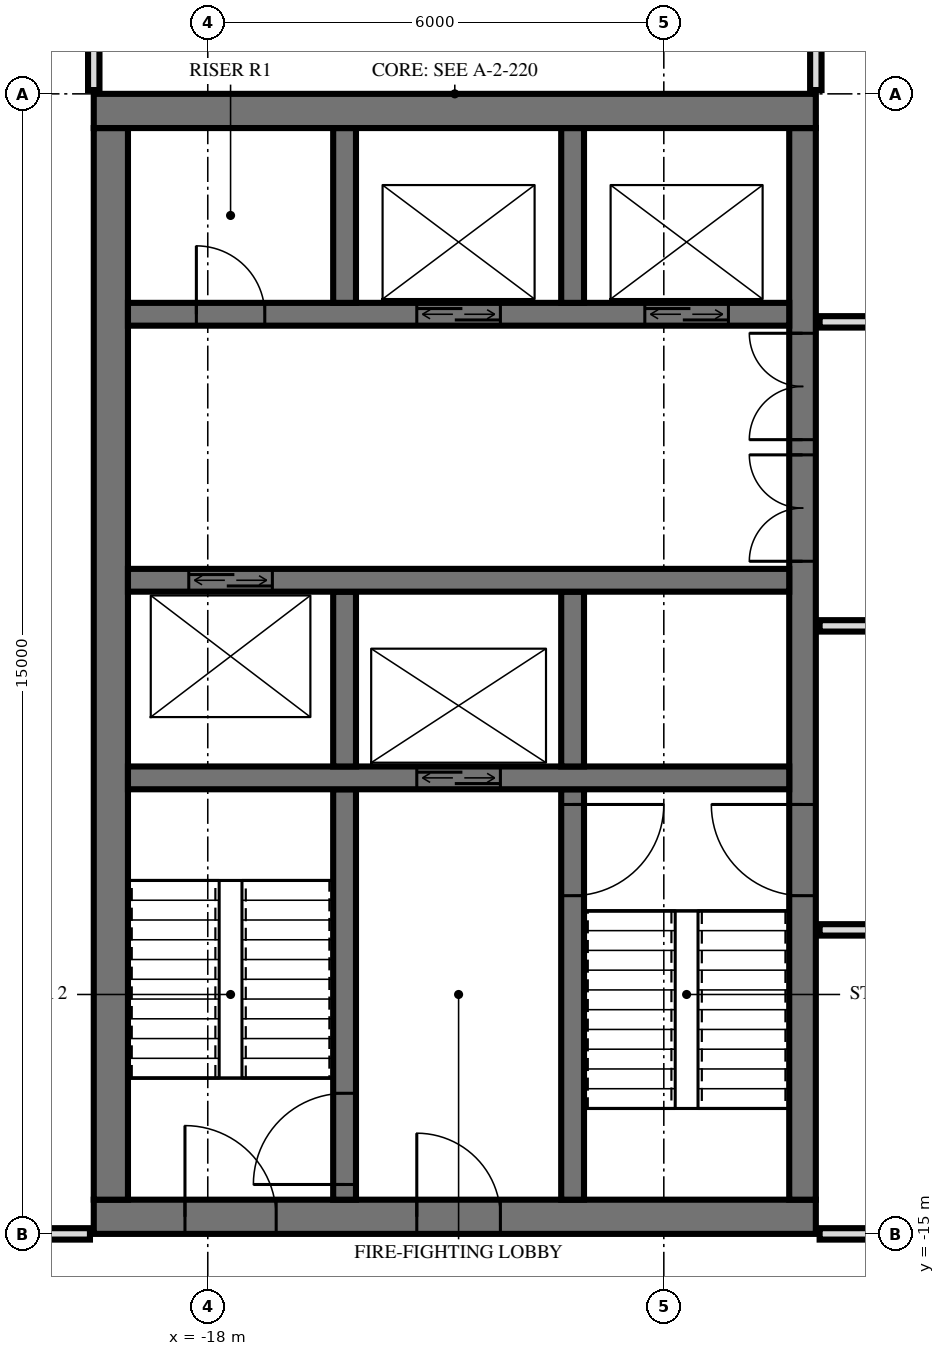
"""IFC4 building model, lengths in metres.
Left out: names, types, materials, properties, quantities, classifications, styles, units other than length and angle.
Written with IfcOpenShell. Run it as: python <this file> out.ifc"""

import sys

from ifc_helpers import new_model, si_unit, direction, frame, frame_2d, origin, place, context, subcontext, project, spatial, rectangle, extrude, element, fill, save


model = new_model("IFC4")
c1 = context("Model", 3, precision=1e-05, world=origin(), true_north=direction((0.0, 1.0)))
c2 = subcontext(c1, "Body", "Model", "MODEL_VIEW")
j1 = project(units=[si_unit("LENGTHUNIT", "METRE"), si_unit("PLANEANGLEUNIT", "RADIAN")], contexts=[c1])
p1 = place(None, origin())
s1 = spatial("IfcSite", under=j1, at=p1, CompositionType="ELEMENT")
p2 = place(p1, origin())
s2 = spatial("IfcBuilding", under=s1, at=p2, CompositionType="ELEMENT")
p3 = place(p2, frame((0.0, 0.0, 322.6)))
s3 = spatial("IfcBuildingStorey", under=s2, at=p3, CompositionType="ELEMENT", Elevation=322.6)
p4 = place(p3, frame((-19.5, -0.225, 0.0), z_axis=(0.0, 0.0, 1.0), x_axis=(1.0, 0.0, 0.0)))
e1 = element("IfcWall", 1, at=p4, inside=s3, PredefinedType="SHEAR", context=c2, shape_type="SweptSolid", body=[
    extrude(rectangle(XDim=9.5, YDim=0.45, at=frame_2d((4.75, 0.0))), origin(), (0.0, 0.0, 1.0), 4.0),
])
p5 = place(p3, frame((-19.5, -14.775, 0.0), z_axis=(0.0, 0.0, 1.0), x_axis=(1.0, 0.0, 0.0)))
e2 = element("IfcWall", 2, at=p5, inside=s3, PredefinedType="SHEAR", context=c2, shape_type="SweptSolid", body=[
    extrude(rectangle(XDim=9.5, YDim=0.45, at=frame_2d((4.75, 0.0))), origin(), (0.0, 0.0, 1.0), 4.0),
])
p6 = place(p5, frame((1.2, 0.0, 0.0)))
e3 = element("IfcOpeningElement", 3, at=p6, cuts=e2, PredefinedType="OPENING", context=c2, shape_type="SweptSolid", body=[
    extrude(rectangle(XDim=1.2, YDim=2.1, at=frame_2d((0.6, 1.05))), frame((0.0, 0.235, 0.0), z_axis=(0.0, -1.0, 0.0), x_axis=(1.0, 0.0, 0.0)), (0.0, 0.0, 1.0), 0.47),
])
p7 = place(p5, frame((4.25, 0.0, 0.0)))
e4 = element("IfcOpeningElement", 4, at=p7, cuts=e2, PredefinedType="OPENING", context=c2, shape_type="SweptSolid", body=[
    extrude(rectangle(XDim=1.1, YDim=2.1, at=frame_2d((0.55, 1.05))), frame((0.0, 0.235, 0.0), z_axis=(0.0, -1.0, 0.0), x_axis=(1.0, 0.0, 0.0)), (0.0, 0.0, 1.0), 0.47),
])
p8 = place(p3, frame((-10.175, -14.55, 0.0), z_axis=(0.0, 0.0, 1.0), x_axis=(0.0, 1.0, 0.0)))
e5 = element("IfcWall", 5, at=p8, inside=s3, PredefinedType="SHEAR", context=c2, shape_type="SweptSolid", body=[
    extrude(rectangle(XDim=14.1, YDim=0.35, at=frame_2d((7.05, 0.0))), origin(), (0.0, 0.0, 1.0), 4.0),
])
p9 = place(p8, frame((8.4, 0.0, 0.0)))
e6 = element("IfcOpeningElement", 6, at=p9, cuts=e5, PredefinedType="OPENING", context=c2, shape_type="SweptSolid", body=[
    extrude(rectangle(XDim=1.4, YDim=2.4, at=frame_2d((0.7, 1.2))), frame((0.0, 0.185, 0.0), z_axis=(0.0, -1.0, 0.0), x_axis=(1.0, 0.0, 0.0)), (0.0, 0.0, 1.0), 0.37),
])
p10 = place(p8, frame((10.0, 0.0, 0.0)))
e7 = element("IfcOpeningElement", 7, at=p10, cuts=e5, PredefinedType="OPENING", context=c2, shape_type="SweptSolid", body=[
    extrude(rectangle(XDim=1.4, YDim=2.4, at=frame_2d((0.7, 1.2))), frame((0.0, 0.185, 0.0), z_axis=(0.0, -1.0, 0.0), x_axis=(1.0, 0.0, 0.0)), (0.0, 0.0, 1.0), 0.37),
])
p11 = place(p8, frame((4.0, 0.0, 0.0)))
e8 = element("IfcOpeningElement", 8, at=p11, cuts=e5, PredefinedType="OPENING", context=c2, shape_type="SweptSolid", body=[
    extrude(rectangle(XDim=1.2, YDim=2.1, at=frame_2d((0.6, 1.05))), frame((0.0, 0.185, 0.0), z_axis=(0.0, -1.0, 0.0), x_axis=(1.0, 0.0, 0.0)), (0.0, 0.0, 1.0), 0.37),
])
p12 = place(p3, frame((-19.275, -14.55, 0.0), z_axis=(0.0, 0.0, 1.0), x_axis=(0.0, 1.0, 0.0)))
e9 = element("IfcWall", 9, at=p12, inside=s3, PredefinedType="SHEAR", context=c2, shape_type="SweptSolid", body=[
    extrude(rectangle(XDim=14.1, YDim=0.45, at=frame_2d((7.05, 0.0))), origin(), (0.0, 0.0, 1.0), 4.0),
])
p13 = place(p3, frame((-19.05, -2.9, 0.0), z_axis=(0.0, 0.0, 1.0), x_axis=(1.0, 0.0, 0.0)))
e10 = element("IfcWall", 10, at=p13, inside=s3, PredefinedType="SHEAR", context=c2, shape_type="SweptSolid", body=[
    extrude(rectangle(XDim=8.7, YDim=0.3, at=frame_2d((4.35, 0.0))), origin(), (0.0, 0.0, 1.0), 4.0),
])
p14 = place(p13, frame((6.8, 0.0, 0.0)))
e11 = element("IfcOpeningElement", 11, at=p14, cuts=e10, PredefinedType="OPENING", context=c2, shape_type="SweptSolid", body=[
    extrude(rectangle(XDim=1.1, YDim=2.1, at=frame_2d((0.55, 1.05))), frame((0.0, 0.16, 0.0), z_axis=(0.0, -1.0, 0.0), x_axis=(1.0, 0.0, 0.0)), (0.0, 0.0, 1.0), 0.32),
])
p15 = place(p13, frame((3.8, 0.0, 0.0)))
e12 = element("IfcOpeningElement", 12, at=p15, cuts=e10, PredefinedType="OPENING", context=c2, shape_type="SweptSolid", body=[
    extrude(rectangle(XDim=1.1, YDim=2.1, at=frame_2d((0.55, 1.05))), frame((0.0, 0.16, 0.0), z_axis=(0.0, -1.0, 0.0), x_axis=(1.0, 0.0, 0.0)), (0.0, 0.0, 1.0), 0.32),
])
p16 = place(p13, frame((0.9, 0.0, 0.0)))
e13 = element("IfcOpeningElement", 13, at=p16, cuts=e10, PredefinedType="OPENING", context=c2, shape_type="SweptSolid", body=[
    extrude(rectangle(XDim=0.9, YDim=2.1, at=frame_2d((0.45, 1.05))), frame((0.0, 0.16, 0.0), z_axis=(0.0, -1.0, 0.0), x_axis=(1.0, 0.0, 0.0)), (0.0, 0.0, 1.0), 0.32),
])
p17 = place(p3, frame((-19.05, -6.4, 0.0), z_axis=(0.0, 0.0, 1.0), x_axis=(1.0, 0.0, 0.0)))
e14 = element("IfcWall", 14, at=p17, inside=s3, PredefinedType="SHEAR", context=c2, shape_type="SweptSolid", body=[
    extrude(rectangle(XDim=8.7, YDim=0.3, at=frame_2d((4.35, 0.0))), origin(), (0.0, 0.0, 1.0), 4.0),
])
p18 = place(p17, frame((0.8, 0.0, 0.0)))
e15 = element("IfcOpeningElement", 15, at=p18, cuts=e14, PredefinedType="OPENING", context=c2, shape_type="SweptSolid", body=[
    extrude(rectangle(XDim=1.1, YDim=2.1, at=frame_2d((0.55, 1.05))), frame((0.0, 0.16, 0.0), z_axis=(0.0, -1.0, 0.0), x_axis=(1.0, 0.0, 0.0)), (0.0, 0.0, 1.0), 0.32),
])
p19 = place(p3, frame((-19.05, -9.0, 0.0), z_axis=(0.0, 0.0, 1.0), x_axis=(1.0, 0.0, 0.0)))
e16 = element("IfcWall", 16, at=p19, inside=s3, PredefinedType="SHEAR", context=c2, shape_type="SweptSolid", body=[
    extrude(rectangle(XDim=8.7, YDim=0.3, at=frame_2d((4.35, 0.0))), origin(), (0.0, 0.0, 1.0), 4.0),
])
p20 = place(p19, frame((3.8, 0.0, 0.0)))
e17 = element("IfcOpeningElement", 17, at=p20, cuts=e16, PredefinedType="OPENING", context=c2, shape_type="SweptSolid", body=[
    extrude(rectangle(XDim=1.1, YDim=2.1, at=frame_2d((0.55, 1.05))), frame((0.0, 0.16, 0.0), z_axis=(0.0, -1.0, 0.0), x_axis=(1.0, 0.0, 0.0)), (0.0, 0.0, 1.0), 0.32),
])
for number, where, z_axis, x_axis in (
    (18, (-13.2, -2.75, 0.0), (0.0, 0.0, 1.0), (0.0, 1.0, 0.0)),
    (19, (-13.2, -8.85, 0.0), (0.0, 0.0, 1.0), (0.0, 1.0, 0.0)),
):
    element("IfcWall", number, at=place(p3, frame(where, z_axis=z_axis, x_axis=x_axis)), inside=s3, PredefinedType="SHEAR", context=c2, shape_type="SweptSolid", body=[
        extrude(rectangle(XDim=2.3, YDim=0.3, at=frame_2d((1.15, 0.0))), origin(), (0.0, 0.0, 1.0), 4.0),
    ])
p21 = place(p3, frame((-13.2, -14.55, 0.0), z_axis=(0.0, 0.0, 1.0), x_axis=(0.0, 1.0, 0.0)))
e20 = element("IfcWall", 20, at=p21, inside=s3, PredefinedType="SHEAR", context=c2, shape_type="SweptSolid", body=[
    extrude(rectangle(XDim=5.4, YDim=0.3, at=frame_2d((2.7, 0.0))), origin(), (0.0, 0.0, 1.0), 4.0),
])
p22 = place(p21, frame((4.0, 0.0, 0.0)))
e21 = element("IfcOpeningElement", 21, at=p22, cuts=e20, PredefinedType="OPENING", context=c2, shape_type="SweptSolid", body=[
    extrude(rectangle(XDim=1.2, YDim=2.1, at=frame_2d((0.6, 1.05))), frame((0.0, 0.16, 0.0), z_axis=(0.0, -1.0, 0.0), x_axis=(1.0, 0.0, 0.0)), (0.0, 0.0, 1.0), 0.32),
])
for number, where, z_axis, x_axis in (
    (22, (-16.2, -2.75, 0.0), (0.0, 0.0, 1.0), (0.0, 1.0, 0.0)),
    (23, (-16.2, -8.85, 0.0), (0.0, 0.0, 1.0), (0.0, 1.0, 0.0)),
):
    element("IfcWall", number, at=place(p3, frame(where, z_axis=z_axis, x_axis=x_axis)), inside=s3, PredefinedType="SHEAR", context=c2, shape_type="SweptSolid", body=[
        extrude(rectangle(XDim=2.3, YDim=0.3, at=frame_2d((1.15, 0.0))), origin(), (0.0, 0.0, 1.0), 4.0),
    ])
p23 = place(p3, frame((-16.2, -14.55, 0.0), z_axis=(0.0, 0.0, 1.0), x_axis=(0.0, 1.0, 0.0)))
e24 = element("IfcWall", 24, at=p23, inside=s3, PredefinedType="SHEAR", context=c2, shape_type="SweptSolid", body=[
    extrude(rectangle(XDim=5.4, YDim=0.3, at=frame_2d((2.7, 0.0))), origin(), (0.0, 0.0, 1.0), 4.0),
])
p24 = place(p23, frame((0.2, 0.0, 0.0)))
e25 = element("IfcOpeningElement", 25, at=p24, cuts=e24, PredefinedType="OPENING", context=c2, shape_type="SweptSolid", body=[
    extrude(rectangle(XDim=1.2, YDim=2.1, at=frame_2d((0.6, 1.05))), frame((0.0, 0.16, 0.0), z_axis=(0.0, -1.0, 0.0), x_axis=(1.0, 0.0, 0.0)), (0.0, 0.0, 1.0), 0.32),
])
p25 = place(p3, frame((-19.568, 1.175, 0.0), z_axis=(0.0, 0.0, 1.0), x_axis=(-0.949694735798, -0.313177120489, 0.0)))
e26 = element("IfcWall", 26, at=p25, inside=s3, PredefinedType="SOLIDWALL", context=c2, shape_type="SweptSolid", body=[
    extrude(rectangle(XDim=1.681, YDim=0.25, at=frame_2d((0.841, 0.0))), origin(), (0.0, 0.0, 1.0), 3.72),
])
p26 = place(p3, frame((-10.0, 0.05, 0.0), z_axis=(0.0, 0.0, 1.0), x_axis=(0.0, 1.0, 0.0)))
e27 = element("IfcWall", 27, at=p26, inside=s3, PredefinedType="PARTITIONING", context=c2, shape_type="SweptSolid", body=[
    extrude(rectangle(XDim=2.247, YDim=0.15, at=frame_2d((1.123, 0.0))), origin(), (0.0, 0.0, 1.0), 3.72),
])
p27 = place(p3, frame((-19.5, 0.05, 0.0), z_axis=(0.0, 0.0, 1.0), x_axis=(0.0, 1.0, 0.0)))
e28 = element("IfcWall", 28, at=p27, inside=s3, PredefinedType="PARTITIONING", context=c2, shape_type="SweptSolid", body=[
    extrude(rectangle(XDim=1.08, YDim=0.15, at=frame_2d((0.54, 0.0))), origin(), (0.0, 0.0, 1.0), 3.72),
])
p28 = place(p3, frame((-21.935, -15.0, 0.0), z_axis=(0.0, 0.0, 1.0), x_axis=(1.0, 0.0, 0.0)))
e29 = element("IfcWall", 29, at=p28, inside=s3, PredefinedType="PARTITIONING", context=c2, shape_type="SweptSolid", body=[
    extrude(rectangle(XDim=2.385, YDim=0.15, at=frame_2d((1.192, 0.0))), origin(), (0.0, 0.0, 1.0), 3.72),
])
p29 = place(p28, frame((0.627, 0.0, 0.0)))
e30 = element("IfcOpeningElement", 30, at=p29, cuts=e29, PredefinedType="OPENING", context=c2, shape_type="SweptSolid", body=[
    extrude(rectangle(XDim=1.0, YDim=2.1, at=frame_2d((0.5, 1.05))), frame((0.0, 0.085, 0.0), z_axis=(0.0, -1.0, 0.0), x_axis=(1.0, 0.0, 0.0)), (0.0, 0.0, 1.0), 0.17),
])
p30 = place(p3, frame((-9.95, -15.0, 0.0), z_axis=(0.0, 0.0, 1.0), x_axis=(1.0, 0.0, 0.0)))
e31 = element("IfcWall", 31, at=p30, inside=s3, PredefinedType="PARTITIONING", context=c2, shape_type="SweptSolid", body=[
    extrude(rectangle(XDim=2.642, YDim=0.15, at=frame_2d((1.321, 0.0))), origin(), (0.0, 0.0, 1.0), 3.084),
])
p31 = place(p3, frame((-9.95, -11.0, 0.0), z_axis=(0.0, 0.0, 1.0), x_axis=(1.0, 0.0, 0.0)))
e32 = element("IfcWall", 32, at=p31, inside=s3, PredefinedType="PARTITIONING", context=c2, shape_type="SweptSolid", body=[
    extrude(rectangle(XDim=19.9, YDim=0.15, at=frame_2d((9.95, 0.0))), origin(), (0.0, 0.0, 1.0), 3.72),
])
p32 = place(p31, frame((9.45, 0.0, 0.0)))
e33 = element("IfcOpeningElement", 33, at=p32, cuts=e32, PredefinedType="OPENING", context=c2, shape_type="SweptSolid", body=[
    extrude(rectangle(XDim=1.0, YDim=2.1, at=frame_2d((0.5, 1.05))), frame((0.0, 0.085, 0.0), z_axis=(0.0, -1.0, 0.0), x_axis=(1.0, 0.0, 0.0)), (0.0, 0.0, 1.0), 0.17),
])
p33 = place(p31, frame((3.45, 0.0, 0.0)))
e34 = element("IfcOpeningElement", 34, at=p33, cuts=e32, PredefinedType="OPENING", context=c2, shape_type="SweptSolid", body=[
    extrude(rectangle(XDim=1.0, YDim=2.1, at=frame_2d((0.5, 1.05))), frame((0.0, 0.085, 0.0), z_axis=(0.0, -1.0, 0.0), x_axis=(1.0, 0.0, 0.0)), (0.0, 0.0, 1.0), 0.17),
])
p34 = place(p3, frame((-9.95, -7.0, 0.0), z_axis=(0.0, 0.0, 1.0), x_axis=(1.0, 0.0, 0.0)))
e35 = element("IfcWall", 35, at=p34, inside=s3, PredefinedType="PARTITIONING", context=c2, shape_type="SweptSolid", body=[
    extrude(rectangle(XDim=19.9, YDim=0.15, at=frame_2d((9.95, 0.0))), origin(), (0.0, 0.0, 1.0), 3.72),
])
p35 = place(p34, frame((9.45, 0.0, 0.0)))
e36 = element("IfcOpeningElement", 36, at=p35, cuts=e35, PredefinedType="OPENING", context=c2, shape_type="SweptSolid", body=[
    extrude(rectangle(XDim=1.0, YDim=2.1, at=frame_2d((0.5, 1.05))), frame((0.0, 0.085, 0.0), z_axis=(0.0, -1.0, 0.0), x_axis=(1.0, 0.0, 0.0)), (0.0, 0.0, 1.0), 0.17),
])
p36 = place(p34, frame((15.45, 0.0, 0.0)))
e37 = element("IfcOpeningElement", 37, at=p36, cuts=e35, PredefinedType="OPENING", context=c2, shape_type="SweptSolid", body=[
    extrude(rectangle(XDim=1.0, YDim=2.1, at=frame_2d((0.5, 1.05))), frame((0.0, 0.085, 0.0), z_axis=(0.0, -1.0, 0.0), x_axis=(1.0, 0.0, 0.0)), (0.0, 0.0, 1.0), 0.17),
])
p37 = place(p3, frame((-9.95, -3.0, 0.0), z_axis=(0.0, 0.0, 1.0), x_axis=(1.0, 0.0, 0.0)))
e38 = element("IfcWall", 38, at=p37, inside=s3, PredefinedType="PARTITIONING", context=c2, shape_type="SweptSolid", body=[
    extrude(rectangle(XDim=19.9, YDim=0.15, at=frame_2d((9.95, 0.0))), origin(), (0.0, 0.0, 1.0), 3.72),
])
p38 = place(p37, frame((2.2, 0.0, 0.0)))
e39 = element("IfcOpeningElement", 39, at=p38, cuts=e38, PredefinedType="OPENING", context=c2, shape_type="SweptSolid", body=[
    extrude(rectangle(XDim=1.0, YDim=2.1, at=frame_2d((0.5, 1.05))), frame((0.0, 0.085, 0.0), z_axis=(0.0, -1.0, 0.0), x_axis=(1.0, 0.0, 0.0)), (0.0, 0.0, 1.0), 0.17),
])
p39 = place(p37, frame((7.2, 0.0, 0.0)))
e40 = element("IfcOpeningElement", 40, at=p39, cuts=e38, PredefinedType="OPENING", context=c2, shape_type="SweptSolid", body=[
    extrude(rectangle(XDim=1.0, YDim=2.1, at=frame_2d((0.5, 1.05))), frame((0.0, 0.085, 0.0), z_axis=(0.0, -1.0, 0.0), x_axis=(1.0, 0.0, 0.0)), (0.0, 0.0, 1.0), 0.17),
])
p40 = place(p37, frame((11.7, 0.0, 0.0)))
e41 = element("IfcOpeningElement", 41, at=p40, cuts=e38, PredefinedType="OPENING", context=c2, shape_type="SweptSolid", body=[
    extrude(rectangle(XDim=1.0, YDim=2.1, at=frame_2d((0.5, 1.05))), frame((0.0, 0.085, 0.0), z_axis=(0.0, -1.0, 0.0), x_axis=(1.0, 0.0, 0.0)), (0.0, 0.0, 1.0), 0.17),
])
p41 = place(p37, frame((15.45, 0.0, 0.0)))
e42 = element("IfcOpeningElement", 42, at=p41, cuts=e38, PredefinedType="OPENING", context=c2, shape_type="SweptSolid", body=[
    extrude(rectangle(XDim=1.0, YDim=2.1, at=frame_2d((0.5, 1.05))), frame((0.0, 0.085, 0.0), z_axis=(0.0, -1.0, 0.0), x_axis=(1.0, 0.0, 0.0)), (0.0, 0.0, 1.0), 0.17),
])
p42 = place(p37, frame((18.2, 0.0, 0.0)))
e43 = element("IfcOpeningElement", 43, at=p42, cuts=e38, PredefinedType="OPENING", context=c2, shape_type="SweptSolid", body=[
    extrude(rectangle(XDim=1.0, YDim=2.1, at=frame_2d((0.5, 1.05))), frame((0.0, 0.085, 0.0), z_axis=(0.0, -1.0, 0.0), x_axis=(1.0, 0.0, 0.0)), (0.0, 0.0, 1.0), 0.17),
])
p43 = place(p14, origin())
e44 = element("IfcDoor", 44, at=p43, inside=s3, OperationType="DOUBLE_DOOR_SLIDING", PredefinedType="USERDEFINED", context=c2, shape_type="SweptSolid", body=[
    extrude(rectangle(XDim=1.1, YDim=2.1, at=frame_2d((0.55, 1.05))), frame((0.0, 0.025, 0.0), z_axis=(0.0, -1.0, 0.0), x_axis=(1.0, 0.0, 0.0)), (0.0, 0.0, 1.0), 0.05),
])
fill(e11, e44)
p44 = place(p15, origin())
e45 = element("IfcDoor", 45, at=p44, inside=s3, OperationType="DOUBLE_DOOR_SLIDING", PredefinedType="USERDEFINED", context=c2, shape_type="SweptSolid", body=[
    extrude(rectangle(XDim=1.1, YDim=2.1, at=frame_2d((0.55, 1.05))), frame((0.0, 0.025, 0.0), z_axis=(0.0, -1.0, 0.0), x_axis=(1.0, 0.0, 0.0)), (0.0, 0.0, 1.0), 0.05),
])
fill(e12, e45)
p45 = place(p20, origin())
e46 = element("IfcDoor", 46, at=p45, inside=s3, OperationType="DOUBLE_DOOR_SLIDING", PredefinedType="USERDEFINED", context=c2, shape_type="SweptSolid", body=[
    extrude(rectangle(XDim=1.1, YDim=2.1, at=frame_2d((0.55, 1.05))), frame((0.0, 0.025, 0.0), z_axis=(0.0, -1.0, 0.0), x_axis=(1.0, 0.0, 0.0)), (0.0, 0.0, 1.0), 0.05),
])
fill(e17, e46)
p46 = place(p18, origin())
e47 = element("IfcDoor", 47, at=p46, inside=s3, OperationType="DOUBLE_DOOR_SLIDING", PredefinedType="USERDEFINED", context=c2, shape_type="SweptSolid", body=[
    extrude(rectangle(XDim=1.1, YDim=2.1, at=frame_2d((0.55, 1.05))), frame((0.0, 0.025, 0.0), z_axis=(0.0, -1.0, 0.0), x_axis=(1.0, 0.0, 0.0)), (0.0, 0.0, 1.0), 0.05),
])
fill(e15, e47)
p47 = place(p9, origin())
e48 = element("IfcDoor", 48, at=p47, inside=s3, OperationType="DOUBLE_DOOR_SINGLE_SWING", PredefinedType="DOOR", context=c2, shape_type="SweptSolid", body=[
    extrude(rectangle(XDim=1.4, YDim=2.4, at=frame_2d((0.7, 1.2))), frame((0.0, 0.025, 0.0), z_axis=(0.0, -1.0, 0.0), x_axis=(1.0, 0.0, 0.0)), (0.0, 0.0, 1.0), 0.05),
])
fill(e6, e48)
p48 = place(p10, origin())
e49 = element("IfcDoor", 49, at=p48, inside=s3, OperationType="DOUBLE_DOOR_SINGLE_SWING", PredefinedType="DOOR", context=c2, shape_type="SweptSolid", body=[
    extrude(rectangle(XDim=1.4, YDim=2.4, at=frame_2d((0.7, 1.2))), frame((0.0, 0.025, 0.0), z_axis=(0.0, -1.0, 0.0), x_axis=(1.0, 0.0, 0.0)), (0.0, 0.0, 1.0), 0.05),
])
fill(e7, e49)
p49 = place(p11, origin())
e50 = element("IfcDoor", 50, at=p49, inside=s3, OperationType="SINGLE_SWING_LEFT", PredefinedType="DOOR", context=c2, shape_type="SweptSolid", body=[
    extrude(rectangle(XDim=1.2, YDim=2.1, at=frame_2d((0.6, 1.05))), frame((0.0, 0.025, 0.0), z_axis=(0.0, -1.0, 0.0), x_axis=(1.0, 0.0, 0.0)), (0.0, 0.0, 1.0), 0.05),
])
fill(e8, e50)
p50 = place(p6, origin())
e51 = element("IfcDoor", 51, at=p50, inside=s3, OperationType="SINGLE_SWING_RIGHT", PredefinedType="DOOR", context=c2, shape_type="SweptSolid", body=[
    extrude(rectangle(XDim=1.2, YDim=2.1, at=frame_2d((0.6, 1.05))), frame((0.0, 0.025, 0.0), z_axis=(0.0, -1.0, 0.0), x_axis=(1.0, 0.0, 0.0)), (0.0, 0.0, 1.0), 0.05),
])
fill(e3, e51)
p51 = place(p7, origin())
e52 = element("IfcDoor", 52, at=p51, inside=s3, OperationType="SINGLE_SWING_RIGHT", PredefinedType="DOOR", context=c2, shape_type="SweptSolid", body=[
    extrude(rectangle(XDim=1.1, YDim=2.1, at=frame_2d((0.55, 1.05))), frame((0.0, 0.025, 0.0), z_axis=(0.0, -1.0, 0.0), x_axis=(1.0, 0.0, 0.0)), (0.0, 0.0, 1.0), 0.05),
])
fill(e4, e52)
p52 = place(p16, origin())
e53 = element("IfcDoor", 53, at=p52, inside=s3, OperationType="SINGLE_SWING_RIGHT", PredefinedType="DOOR", context=c2, shape_type="SweptSolid", body=[
    extrude(rectangle(XDim=0.9, YDim=2.1, at=frame_2d((0.45, 1.05))), frame((0.0, 0.025, 0.0), z_axis=(0.0, -1.0, 0.0), x_axis=(1.0, 0.0, 0.0)), (0.0, 0.0, 1.0), 0.05),
])
fill(e13, e53)
p53 = place(p22, frame((0.6, 0.0, 0.0), z_axis=(0.0, 0.0, 1.0), x_axis=(-1.0, 0.0, 0.0)))
e54 = element("IfcDoor", 54, at=p53, inside=s3, OperationType="SINGLE_SWING_RIGHT", PredefinedType="DOOR", context=c2, shape_type="SweptSolid", body=[
    extrude(rectangle(XDim=1.2, YDim=2.1, at=frame_2d((0.0, 1.05))), frame((0.0, -0.025, 0.0), z_axis=(0.0, 1.0, 0.0), x_axis=(-1.0, 0.0, 0.0)), (0.0, 0.0, 1.0), 0.05),
])
fill(e21, e54)
p54 = place(p24, origin())
e55 = element("IfcDoor", 55, at=p54, inside=s3, OperationType="SINGLE_SWING_RIGHT", PredefinedType="DOOR", context=c2, shape_type="SweptSolid", body=[
    extrude(rectangle(XDim=1.2, YDim=2.1, at=frame_2d((0.6, 1.05))), frame((0.0, 0.025, 0.0), z_axis=(0.0, -1.0, 0.0), x_axis=(1.0, 0.0, 0.0)), (0.0, 0.0, 1.0), 0.05),
])
fill(e25, e55)
save(model, sys.argv[1])
